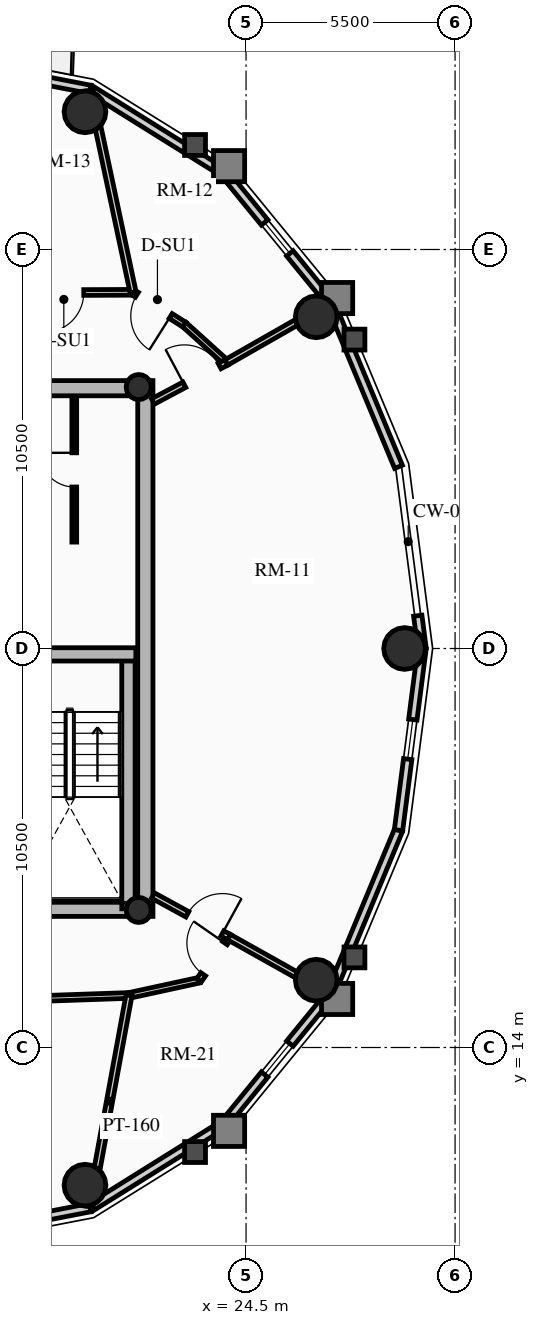
"""IFC4 building model, lengths in metres.
Left out: names, types, materials, properties, quantities, classifications, styles, units other than length and angle.
Written with IfcOpenShell. Run it as: python <this file> out.ifc"""

import sys

from ifc_helpers import new_model, si_unit, direction, frame, frame_2d, origin, origin_2d, place, context, subcontext, project, spatial, rectangle, circle, hollow_circle, extrude, source, transform, mapped, element, fill, save


model = new_model("IFC4")
c1 = context("Model", 3, precision=1e-05, world=origin(), true_north=direction((0.0, 1.0)))
c2 = subcontext(c1, "Body", "Model", "MODEL_VIEW")
j1 = project(units=[si_unit("LENGTHUNIT", "METRE"), si_unit("PLANEANGLEUNIT", "RADIAN")], contexts=[c1])
p1 = place(None, origin())
s1 = spatial("IfcSite", under=j1, at=p1, CompositionType="ELEMENT")
p2 = place(p1, origin())
s2 = spatial("IfcBuilding", under=s1, at=p2, CompositionType="ELEMENT")
p3 = place(p2, frame((0.0, 0.0, 208.3)))
s3 = spatial("IfcBuildingStorey", under=s2, at=p3, CompositionType="ELEMENT", Elevation=208.3)
p4 = place(p3, frame((21.85, 17.45, 0.0), z_axis=(0.0, 0.0, 1.0), x_axis=(0.0, 1.0, 0.0)))
e1 = element("IfcWall", 1, at=p4, inside=s3, PredefinedType="SHEAR", context=c2, shape_type="SweptSolid", body=[
    extrude(rectangle(XDim=14.1, YDim=0.4, at=frame_2d((7.05, 0.0))), origin(), (0.0, 0.0, 1.0), 2.91),
])
p5 = place(p3, frame((11.15, 17.65, 0.0), z_axis=(0.0, 0.0, 1.0), x_axis=(1.0, 0.0, 0.0)))
e2 = element("IfcWall", 2, at=p5, inside=s3, PredefinedType="SHEAR", context=c2, shape_type="SweptSolid", body=[
    extrude(rectangle(XDim=10.7, YDim=0.4, at=frame_2d((5.35, 0.0))), origin(), (0.0, 0.0, 1.0), 2.91),
])
m1 = source(origin(), c2, "Body", "SweptSolid", [
    extrude(rectangle(XDim=1.5, YDim=2.02, at=frame_2d((0.75, 1.01))), frame((0.0, 0.21, 0.0), z_axis=(0.0, -1.0, 0.0), x_axis=(1.0, 0.0, 0.0)), (0.0, 0.0, 1.0), 0.42),
])
p6 = place(p5, frame((5.45, 0.0, 0.0)))
e3 = element("IfcOpeningElement", 3, at=p6, cuts=e2, PredefinedType="OPENING", context=c2, shape_type="MappedRepresentation", body=[
    mapped(m1, transform((0.0, 0.0, 0.0), x_axis=(1.0, 0.0, 0.0), y_axis=(0.0, 1.0, 0.0), z_axis=(0.0, 0.0, 1.0), scale=1.0)),
])
p7 = place(p3, frame((11.15, 31.35, 0.0), z_axis=(0.0, 0.0, 1.0), x_axis=(1.0, 0.0, 0.0)))
e4 = element("IfcWall", 4, at=p7, inside=s3, PredefinedType="SHEAR", context=c2, shape_type="SweptSolid", body=[
    extrude(rectangle(XDim=10.7, YDim=0.4, at=frame_2d((5.35, 0.0))), origin(), (0.0, 0.0, 1.0), 2.91),
])
p8 = place(p7, frame((4.6, 0.0, 0.0)))
e5 = element("IfcOpeningElement", 5, at=p8, cuts=e4, PredefinedType="OPENING", context=c2, shape_type="MappedRepresentation", body=[
    mapped(m1, transform((0.0, 0.0, 0.0), x_axis=(1.0, 0.0, 0.0), y_axis=(0.0, 1.0, 0.0), z_axis=(0.0, 0.0, 1.0), scale=1.0)),
])
p9 = place(p3, frame((21.405, 17.65, 0.0), z_axis=(0.0, 0.0, 1.0), x_axis=(0.0, 1.0, 0.0)))
e6 = element("IfcWall", 6, at=p9, inside=s3, PredefinedType="SHEAR", context=c2, shape_type="SweptSolid", body=[
    extrude(rectangle(XDim=6.695, YDim=0.35, at=frame_2d((3.348, 0.0))), origin(), (0.0, 0.0, 1.0), 2.91),
])
p10 = place(p3, frame((18.315, 24.345, 0.0), z_axis=(0.0, 0.0, 1.0), x_axis=(1.0, 0.0, 0.0)))
e7 = element("IfcWall", 7, at=p10, inside=s3, PredefinedType="SHEAR", context=c2, shape_type="SweptSolid", body=[
    extrude(rectangle(XDim=3.285, YDim=0.35, at=frame_2d((1.643, 0.0))), origin(), (0.0, 0.0, 1.0), 2.91),
])
for number, where, z_axis, x_axis in (
    (8, (21.675, 17.62, 0.0), (0.0, 0.0, 1.0), (1.0, 0.0, 0.0)),
    (9, (21.675, 31.38, 0.0), (0.0, 0.0, 1.0), (1.0, 0.0, 0.0)),
):
    element("IfcColumn", number, at=place(p3, frame(where, z_axis=z_axis, x_axis=x_axis)), inside=s3, PredefinedType="COLUMN", context=c2, shape_type="SweptSolid", body=[
        extrude(hollow_circle(Radius=0.33, WallThickness=0.025, at=origin_2d()), origin(), (0.0, 0.0, 1.0), 2.91),
    ])
for number, where, z_axis, x_axis in (
    (10, (28.672, 24.5, 0.0), (0.0, 0.0, 1.0), (1.0, 0.0, 0.0)),
    (11, (26.347, 33.229, 0.0), (0.0, 0.0, 1.0), (1.0, 0.0, 0.0)),
    (12, (20.261, 38.623, 0.0), (0.0, 0.0, 1.0), (1.0, 0.0, 0.0)),
    (13, (20.261, 10.377, 0.0), (0.0, 0.0, 1.0), (1.0, 0.0, 0.0)),
    (14, (26.347, 15.771, 0.0), (0.0, 0.0, 1.0), (1.0, 0.0, 0.0)),
):
    element("IfcColumn", number, at=place(p3, frame(where, z_axis=z_axis, x_axis=x_axis)), inside=s3, PredefinedType="USERDEFINED", context=c2, shape_type="SweptSolid", body=[
        extrude(circle(Radius=0.55, at=origin_2d()), origin(), (0.0, 0.0, 1.0), 2.91),
    ])
p11 = place(p3, frame((29.018, 25.363, 0.0), z_axis=(0.0, 0.0, 1.0), x_axis=(0.128247365719, -0.991742211054, 0.0)))
e15 = element("IfcWall", 15, at=p11, inside=s3, PredefinedType="SOLIDWALL", context=c2, shape_type="SweptSolid", body=[
    extrude(rectangle(XDim=0.87, YDim=0.22, at=frame_2d((0.435, 0.0))), origin(), (0.0, 0.0, 1.0), 2.322),
])
p12 = place(p3, frame((26.718, 33.593, 0.0), z_axis=(0.0, 0.0, 1.0), x_axis=(0.384036305194, -0.923317993052, 0.0)))
e16 = element("IfcWall", 16, at=p12, inside=s3, PredefinedType="SOLIDWALL", context=c2, shape_type="SweptSolid", body=[
    extrude(rectangle(XDim=4.671, YDim=0.22, at=frame_2d((2.335, 0.0))), origin(), (0.0, 0.0, 1.0), 2.322),
])
p13 = place(p3, frame((23.924, 37.015, 0.0), z_axis=(0.0, 0.0, 1.0), x_axis=(0.632467166636, -0.774587169483, 0.0)))
e17 = element("IfcWall", 17, at=p13, inside=s3, PredefinedType="SOLIDWALL", context=c2, shape_type="SweptSolid", body=[
    extrude(rectangle(XDim=4.418, YDim=0.22, at=frame_2d((2.209, 0.0))), origin(), (0.0, 0.0, 1.0), 2.322),
])
m2 = source(origin(), c2, "Body", "SweptSolid", [
    extrude(rectangle(XDim=1.05, YDim=1.3, at=frame_2d((0.525, 0.65))), frame((0.0, 0.12, 0.0), z_axis=(0.0, -1.0, 0.0), x_axis=(1.0, 0.0, 0.0)), (0.0, 0.0, 1.0), 0.24),
])
p14 = place(p13, frame((1.684, 0.0, 0.65)))
e18 = element("IfcOpeningElement", 18, at=p14, cuts=e17, PredefinedType="OPENING", context=c2, shape_type="MappedRepresentation", body=[
    mapped(m2, transform((0.0, 0.0, 0.0), x_axis=(1.0, 0.0, 0.0), y_axis=(0.0, 1.0, 0.0), z_axis=(0.0, 0.0, 1.0), scale=1.0)),
])
p15 = place(p3, frame((20.403, 39.213, 0.0), z_axis=(0.0, 0.0, 1.0), x_axis=(0.848318713376, -0.529485939886, 0.0)))
e19 = element("IfcWall", 19, at=p15, inside=s3, PredefinedType="SOLIDWALL", context=c2, shape_type="SweptSolid", body=[
    extrude(rectangle(XDim=4.15, YDim=0.22, at=frame_2d((2.075, 0.0))), origin(), (0.0, 0.0, 1.0), 2.322),
])
p16 = place(p3, frame((16.5, 39.97, 0.0), z_axis=(0.0, 0.0, 1.0), x_axis=(0.981700307484, -0.190432419211, 0.0)))
e20 = element("IfcWall", 20, at=p16, inside=s3, PredefinedType="SOLIDWALL", context=c2, shape_type="SweptSolid", body=[
    extrude(rectangle(XDim=3.976, YDim=0.22, at=frame_2d((1.988, 0.0))), origin(), (0.0, 0.0, 1.0), 2.322),
])
m3 = source(origin(), c2, "Body", "SweptSolid", [
    extrude(rectangle(XDim=1.15, YDim=2.005, at=frame_2d((0.575, 1.002))), frame((0.0, 0.12, 0.0), z_axis=(0.0, -1.0, 0.0), x_axis=(1.0, 0.0, 0.0)), (0.0, 0.0, 1.0), 0.24),
])
p17 = place(p16, frame((1.413, 0.0, 0.0)))
e21 = element("IfcOpeningElement", 21, at=p17, cuts=e20, PredefinedType="OPENING", context=c2, shape_type="MappedRepresentation", body=[
    mapped(m3, transform((0.0, 0.0, 0.0), x_axis=(1.0, 0.0, 0.0), y_axis=(0.0, 1.0, 0.0), z_axis=(0.0, 0.0, 1.0), scale=1.0)),
])
p18 = place(p3, frame((20.403, 9.787, 0.0), z_axis=(0.0, 0.0, 1.0), x_axis=(-0.981700307484, -0.190432419211, 0.0)))
e22 = element("IfcWall", 22, at=p18, inside=s3, PredefinedType="SOLIDWALL", context=c2, shape_type="SweptSolid", body=[
    extrude(rectangle(XDim=3.976, YDim=0.22, at=frame_2d((1.988, 0.0))), origin(), (0.0, 0.0, 1.0), 2.322),
])
p19 = place(p18, frame((1.463, 0.0, 0.65)))
e23 = element("IfcOpeningElement", 23, at=p19, cuts=e22, PredefinedType="OPENING", context=c2, shape_type="MappedRepresentation", body=[
    mapped(m2, transform((0.0, 0.0, 0.0), x_axis=(1.0, 0.0, 0.0), y_axis=(0.0, 1.0, 0.0), z_axis=(0.0, 0.0, 1.0), scale=1.0)),
])
p20 = place(p3, frame((23.924, 11.985, 0.0), z_axis=(0.0, 0.0, 1.0), x_axis=(-0.848318713376, -0.529485939886, 0.0)))
e24 = element("IfcWall", 24, at=p20, inside=s3, PredefinedType="SOLIDWALL", context=c2, shape_type="SweptSolid", body=[
    extrude(rectangle(XDim=4.15, YDim=0.22, at=frame_2d((2.075, 0.0))), origin(), (0.0, 0.0, 1.0), 2.322),
])
p21 = place(p3, frame((26.718, 15.407, 0.0), z_axis=(0.0, 0.0, 1.0), x_axis=(-0.632467166636, -0.774587169483, 0.0)))
e25 = element("IfcWall", 25, at=p21, inside=s3, PredefinedType="SOLIDWALL", context=c2, shape_type="SweptSolid", body=[
    extrude(rectangle(XDim=4.418, YDim=0.22, at=frame_2d((2.209, 0.0))), origin(), (0.0, 0.0, 1.0), 2.322),
])
p22 = place(p21, frame((1.684, 0.0, 0.65)))
e26 = element("IfcOpeningElement", 26, at=p22, cuts=e25, PredefinedType="OPENING", context=c2, shape_type="MappedRepresentation", body=[
    mapped(m2, transform((0.0, 0.0, 0.0), x_axis=(1.0, 0.0, 0.0), y_axis=(0.0, 1.0, 0.0), z_axis=(0.0, 0.0, 1.0), scale=1.0)),
])
p23 = place(p3, frame((28.512, 19.719, 0.0), z_axis=(0.0, 0.0, 1.0), x_axis=(-0.384036305194, -0.923317993052, 0.0)))
e27 = element("IfcWall", 27, at=p23, inside=s3, PredefinedType="SOLIDWALL", context=c2, shape_type="SweptSolid", body=[
    extrude(rectangle(XDim=4.671, YDim=0.22, at=frame_2d((2.335, 0.0))), origin(), (0.0, 0.0, 1.0), 2.322),
])
p24 = place(p3, frame((29.13, 24.5, 0.0), z_axis=(0.0, 0.0, 1.0), x_axis=(-0.128241318541, -0.991742993027, 0.0)))
e28 = element("IfcWall", 28, at=p24, inside=s3, PredefinedType="SOLIDWALL", context=c2, shape_type="SweptSolid", body=[
    extrude(rectangle(XDim=4.82, YDim=0.22, at=frame_2d((2.41, 0.0))), origin(), (0.0, 0.0, 1.0), 2.322),
])
p25 = place(p24, frame((1.885, 0.0, 0.65)))
e29 = element("IfcOpeningElement", 29, at=p25, cuts=e28, PredefinedType="OPENING", context=c2, shape_type="MappedRepresentation", body=[
    mapped(m2, transform((0.0, 0.0, 0.0), x_axis=(1.0, 0.0, 0.0), y_axis=(0.0, 1.0, 0.0), z_axis=(0.0, 0.0, 1.0), scale=1.0)),
])
p26 = place(p3, frame((19.98, 27.3, 0.0), z_axis=(0.0, 0.0, 1.0), x_axis=(0.0, 1.0, 0.0)))
e30 = element("IfcWall", 30, at=p26, inside=s3, PredefinedType="PARTITIONING", context=c2, shape_type="SweptSolid", body=[
    extrude(rectangle(XDim=3.82, YDim=0.125, at=frame_2d((1.91, 0.0))), origin(), (0.0, 0.0, 1.0), 2.685),
])
m4 = source(origin(), c2, "Body", "SweptSolid", [
    extrude(rectangle(XDim=0.9, YDim=2.005, at=frame_2d((0.45, 1.002))), frame((0.0, 0.073, 0.0), z_axis=(0.0, -1.0, 0.0), x_axis=(1.0, 0.0, 0.0)), (0.0, 0.0, 1.0), 0.145),
])
p27 = place(p26, frame((1.45, 0.0, 0.0)))
e31 = element("IfcOpeningElement", 31, at=p27, cuts=e30, PredefinedType="OPENING", context=c2, shape_type="MappedRepresentation", body=[
    mapped(m4, transform((0.0, 0.0, 0.0), x_axis=(1.0, 0.0, 0.0), y_axis=(0.0, 1.0, 0.0), z_axis=(0.0, 0.0, 1.0), scale=1.0)),
])
p28 = place(p3, frame((23.98, 32.027, 0.0), z_axis=(0.0, 0.0, 1.0), x_axis=(-0.742353224332, 0.670008724065, 0.0)))
e32 = element("IfcWall", 32, at=p28, inside=s3, PredefinedType="PARTITIONING", context=c2, shape_type="SweptSolid", body=[
    extrude(rectangle(XDim=1.485, YDim=0.15, at=frame_2d((0.742, 0.0))), origin(), (0.0, 0.0, 1.0), 2.322),
])
p29 = place(p3, frame((22.877, 33.022, 0.0), z_axis=(0.0, 0.0, 1.0), x_axis=(-0.845895608855, 0.533348496689, 0.0)))
e33 = element("IfcWall", 33, at=p29, inside=s3, PredefinedType="PARTITIONING", context=c2, shape_type="SweptSolid", body=[
    extrude(rectangle(XDim=1.597, YDim=0.15, at=frame_2d((0.798, 0.0))), origin(), (0.0, 0.0, 1.0), 2.255),
])
m5 = source(origin(), c2, "Body", "SweptSolid", [
    extrude(rectangle(XDim=1.05, YDim=2.015, at=frame_2d((0.525, 1.007))), frame((0.0, 0.085, 0.0), z_axis=(0.0, -1.0, 0.0), x_axis=(1.0, 0.0, 0.0)), (0.0, 0.0, 1.0), 0.17),
])
p30 = place(p29, frame((0.427, 0.0, 0.0)))
e34 = element("IfcOpeningElement", 34, at=p30, cuts=e33, PredefinedType="OPENING", context=c2, shape_type="MappedRepresentation", body=[
    mapped(m5, transform((0.0, 0.0, 0.0), x_axis=(1.0, 0.0, 0.0), y_axis=(0.0, 1.0, 0.0), z_axis=(0.0, 0.0, 1.0), scale=1.0)),
])
p31 = place(p3, frame((21.527, 33.873, 0.0), z_axis=(0.0, 0.0, 1.0), x_axis=(-0.999991838845, -0.004040079574, 0.0)))
e35 = element("IfcWall", 35, at=p31, inside=s3, PredefinedType="PARTITIONING", context=c2, shape_type="SweptSolid", body=[
    extrude(rectangle(XDim=3.384, YDim=0.15, at=frame_2d((1.692, 0.0))), origin(), (0.0, 0.0, 1.0), 2.322),
])
p32 = place(p31, frame((1.298, 0.0, 0.0)))
e36 = element("IfcOpeningElement", 36, at=p32, cuts=e35, PredefinedType="OPENING", context=c2, shape_type="MappedRepresentation", body=[
    mapped(m5, transform((0.0, 0.0, 0.0), x_axis=(1.0, 0.0, 0.0), y_axis=(0.0, 1.0, 0.0), z_axis=(0.0, 0.0, 1.0), scale=1.0)),
])
p33 = place(p3, frame((14.781, 15.141, 0.0), z_axis=(0.0, 0.0, 1.0), x_axis=(0.999407918707, 0.034406569513, 0.0)))
e37 = element("IfcWall", 37, at=p33, inside=s3, PredefinedType="PARTITIONING", context=c2, shape_type="SweptSolid", body=[
    extrude(rectangle(XDim=6.642, YDim=0.15, at=frame_2d((3.321, 0.0))), origin(), (0.0, 0.0, 1.0), 2.255),
])
p34 = place(p33, frame((2.796, 0.0, 0.0)))
e38 = element("IfcOpeningElement", 38, at=p34, cuts=e37, PredefinedType="OPENING", context=c2, shape_type="MappedRepresentation", body=[
    mapped(m5, transform((0.0, 0.0, 0.0), x_axis=(1.0, 0.0, 0.0), y_axis=(0.0, 1.0, 0.0), z_axis=(0.0, 0.0, 1.0), scale=1.0)),
])
p35 = place(p3, frame((21.419, 15.369, 0.0), z_axis=(0.0, 0.0, 1.0), x_axis=(0.977192701953, 0.212354475464, 0.0)))
e39 = element("IfcWall", 39, at=p35, inside=s3, PredefinedType="PARTITIONING", context=c2, shape_type="SweptSolid", body=[
    extrude(rectangle(XDim=1.888, YDim=0.15, at=frame_2d((0.944, 0.0))), origin(), (0.0, 0.0, 1.0), 2.255),
])
p36 = place(p3, frame((23.263, 15.77, 0.0), z_axis=(0.0, 0.0, 1.0), x_axis=(0.570743456919, 0.821128434768, 0.0)))
e40 = element("IfcWall", 40, at=p36, inside=s3, PredefinedType="PARTITIONING", context=c2, shape_type="SweptSolid", body=[
    extrude(rectangle(XDim=1.382, YDim=0.15, at=frame_2d((0.691, 0.0))), origin(), (0.0, 0.0, 1.0), 2.322),
])
m6 = source(origin(), c2, "Body", "SweptSolid", [
    extrude(rectangle(XDim=1.0, YDim=2.015, at=frame_2d((0.5, 1.007))), frame((0.0, 0.085, 0.0), z_axis=(0.0, -1.0, 0.0), x_axis=(1.0, 0.0, 0.0)), (0.0, 0.0, 1.0), 0.17),
])
p37 = place(p36, frame((0.191, 0.0, 0.0)))
e41 = element("IfcOpeningElement", 41, at=p37, cuts=e40, PredefinedType="OPENING", context=c2, shape_type="MappedRepresentation", body=[
    mapped(m6, transform((0.0, 0.0, 0.0), x_axis=(1.0, 0.0, 0.0), y_axis=(0.0, 1.0, 0.0), z_axis=(0.0, 0.0, 1.0), scale=1.0)),
])
p38 = place(p3, frame((23.98, 32.027, 0.0), z_axis=(0.0, 0.0, 1.0), x_axis=(0.868372526378, 0.495912447345, 0.0)))
e42 = element("IfcWall", 42, at=p38, inside=s3, PredefinedType="PARTITIONING", context=c2, shape_type="SweptSolid", body=[
    extrude(rectangle(XDim=3.135, YDim=0.16, at=frame_2d((1.567, 0.0))), origin(), (0.0, 0.0, 1.0), 2.322),
])
p39 = place(p3, frame((21.527, 33.873, 0.0), z_axis=(0.0, 0.0, 1.0), x_axis=(-0.207772326864, 0.97817721308, 0.0)))
e43 = element("IfcWall", 43, at=p39, inside=s3, PredefinedType="PARTITIONING", context=c2, shape_type="SweptSolid", body=[
    extrude(rectangle(XDim=5.439, YDim=0.16, at=frame_2d((2.72, 0.0))), origin(), (0.0, 0.0, 1.0), 2.322),
])
p40 = place(p3, frame((21.419, 15.369, 0.0), z_axis=(0.0, 0.0, 1.0), x_axis=(-0.180685606423, -0.98354090491, 0.0)))
e44 = element("IfcWall", 44, at=p40, inside=s3, PredefinedType="PARTITIONING", context=c2, shape_type="SweptSolid", body=[
    extrude(rectangle(XDim=5.656, YDim=0.16, at=frame_2d((2.828, 0.0))), origin(), (0.0, 0.0, 1.0), 2.322),
])
p41 = place(p3, frame((24.052, 16.905, 0.0), z_axis=(0.0, 0.0, 1.0), x_axis=(0.872220814965, -0.489112308106, 0.0)))
e45 = element("IfcWall", 45, at=p41, inside=s3, PredefinedType="PARTITIONING", context=c2, shape_type="SweptSolid", body=[
    extrude(rectangle(XDim=3.038, YDim=0.16, at=frame_2d((1.519, 0.0))), origin(), (0.0, 0.0, 1.0), 2.322),
])
p42 = place(p3, frame((22.05, 31.0, 0.0), z_axis=(0.0, 0.0, 1.0), x_axis=(0.882791584709, 0.469764853908, 0.0)))
e46 = element("IfcWall", 46, at=p42, inside=s3, PredefinedType="PARTITIONING", context=c2, shape_type="SweptSolid", body=[
    extrude(rectangle(XDim=2.186, YDim=0.16, at=frame_2d((1.093, 0.0))), origin(), (0.0, 0.0, 1.0), 2.255),
])
m7 = source(origin(), c2, "Body", "SweptSolid", [
    extrude(rectangle(XDim=1.05, YDim=2.015, at=frame_2d((0.525, 1.007))), frame((0.0, 0.09, 0.0), z_axis=(0.0, -1.0, 0.0), x_axis=(1.0, 0.0, 0.0)), (0.0, 0.0, 1.0), 0.18),
])
p43 = place(p42, frame((0.936, 0.0, 0.0)))
e47 = element("IfcOpeningElement", 47, at=p43, cuts=e46, PredefinedType="OPENING", context=c2, shape_type="MappedRepresentation", body=[
    mapped(m7, transform((0.0, 0.0, 0.0), x_axis=(1.0, 0.0, 0.0), y_axis=(0.0, 1.0, 0.0), z_axis=(0.0, 0.0, 1.0), scale=1.0)),
])
p44 = place(p3, frame((22.05, 18.0, 0.0), z_axis=(0.0, 0.0, 1.0), x_axis=(0.877252891813, -0.480028503118, 0.0)))
e48 = element("IfcWall", 48, at=p44, inside=s3, PredefinedType="PARTITIONING", context=c2, shape_type="SweptSolid", body=[
    extrude(rectangle(XDim=2.282, YDim=0.16, at=frame_2d((1.141, 0.0))), origin(), (0.0, 0.0, 1.0), 2.255),
])
p45 = place(p44, frame((1.032, 0.0, 0.0)))
e49 = element("IfcOpeningElement", 49, at=p45, cuts=e48, PredefinedType="OPENING", context=c2, shape_type="MappedRepresentation", body=[
    mapped(m7, transform((0.0, 0.0, 0.0), x_axis=(1.0, 0.0, 0.0), y_axis=(0.0, 1.0, 0.0), z_axis=(0.0, 0.0, 1.0), scale=1.0)),
])
m8 = source(origin(), c2, "Body", "SweptSolid", [
    extrude(rectangle(XDim=1.05, YDim=1.3, at=frame_2d((0.525, 0.65))), frame((0.0, 0.03, 0.0), z_axis=(0.0, -1.0, 0.0), x_axis=(1.0, 0.0, 0.0)), (0.0, 0.0, 1.0), 0.06),
])
p46 = place(p14, origin())
e50 = element("IfcWindow", 50, at=p46, inside=s3, PartitioningType="SINGLE_PANEL", PredefinedType="WINDOW", context=c2, shape_type="MappedRepresentation", body=[
    mapped(m8, transform((0.0, 0.0, 0.0), x_axis=(1.0, 0.0, 0.0), y_axis=(0.0, 1.0, 0.0), z_axis=(0.0, 0.0, 1.0), scale=1.0)),
])
fill(e18, e50)
p47 = place(p22, origin())
e51 = element("IfcWindow", 51, at=p47, inside=s3, PartitioningType="SINGLE_PANEL", PredefinedType="WINDOW", context=c2, shape_type="MappedRepresentation", body=[
    mapped(m8, transform((0.0, 0.0, 0.0), x_axis=(1.0, 0.0, 0.0), y_axis=(0.0, 1.0, 0.0), z_axis=(0.0, 0.0, 1.0), scale=1.0)),
])
fill(e26, e51)
p48 = place(p25, origin())
e52 = element("IfcWindow", 52, at=p48, inside=s3, PartitioningType="SINGLE_PANEL", PredefinedType="WINDOW", context=c2, shape_type="MappedRepresentation", body=[
    mapped(m8, transform((0.0, 0.0, 0.0), x_axis=(1.0, 0.0, 0.0), y_axis=(0.0, 1.0, 0.0), z_axis=(0.0, 0.0, 1.0), scale=1.0)),
])
fill(e29, e52)
m9 = source(origin(), c2, "Body", "SweptSolid", [
    extrude(rectangle(XDim=0.9, YDim=2.005, at=frame_2d((0.45, 1.002))), frame((0.0, 0.025, 0.0), z_axis=(0.0, -1.0, 0.0), x_axis=(1.0, 0.0, 0.0)), (0.0, 0.0, 1.0), 0.05),
])
p49 = place(p27, origin())
e53 = element("IfcDoor", 53, at=p49, inside=s3, OperationType="SINGLE_SWING_RIGHT", PredefinedType="DOOR", context=c2, shape_type="MappedRepresentation", body=[
    mapped(m9, transform((0.0, 0.0, 0.0), x_axis=(1.0, 0.0, 0.0), y_axis=(0.0, 1.0, 0.0), z_axis=(0.0, 0.0, 1.0), scale=1.0)),
])
fill(e31, e53)
m10 = source(origin(), c2, "Body", "SweptSolid", [
    extrude(rectangle(XDim=1.05, YDim=2.015, at=frame_2d((0.525, 1.007))), frame((0.0, 0.025, 0.0), z_axis=(0.0, -1.0, 0.0), x_axis=(1.0, 0.0, 0.0)), (0.0, 0.0, 1.0), 0.05),
])
p50 = place(p43, origin())
e54 = element("IfcDoor", 54, at=p50, inside=s3, OperationType="SINGLE_SWING_LEFT", PredefinedType="DOOR", context=c2, shape_type="MappedRepresentation", body=[
    mapped(m10, transform((0.0, 0.0, 0.0), x_axis=(1.0, 0.0, 0.0), y_axis=(0.0, 1.0, 0.0), z_axis=(0.0, 0.0, 1.0), scale=1.0)),
])
fill(e47, e54)
p51 = place(p45, origin())
e55 = element("IfcDoor", 55, at=p51, inside=s3, OperationType="SINGLE_SWING_RIGHT", PredefinedType="DOOR", context=c2, shape_type="MappedRepresentation", body=[
    mapped(m10, transform((0.0, 0.0, 0.0), x_axis=(1.0, 0.0, 0.0), y_axis=(0.0, 1.0, 0.0), z_axis=(0.0, 0.0, 1.0), scale=1.0)),
])
fill(e49, e55)
p52 = place(p30, origin())
e56 = element("IfcDoor", 56, at=p52, inside=s3, OperationType="SINGLE_SWING_LEFT", PredefinedType="DOOR", context=c2, shape_type="MappedRepresentation", body=[
    mapped(m10, transform((0.0, 0.0, 0.0), x_axis=(1.0, 0.0, 0.0), y_axis=(0.0, 1.0, 0.0), z_axis=(0.0, 0.0, 1.0), scale=1.0)),
])
fill(e34, e56)
p53 = place(p32, origin())
e57 = element("IfcDoor", 57, at=p53, inside=s3, OperationType="SINGLE_SWING_RIGHT", PredefinedType="DOOR", context=c2, shape_type="MappedRepresentation", body=[
    mapped(m10, transform((0.0, 0.0, 0.0), x_axis=(1.0, 0.0, 0.0), y_axis=(0.0, 1.0, 0.0), z_axis=(0.0, 0.0, 1.0), scale=1.0)),
])
fill(e36, e57)
m11 = source(origin(), c2, "Body", "SweptSolid", [
    extrude(rectangle(XDim=1.0, YDim=2.015, at=frame_2d((0.5, 1.007))), frame((0.0, 0.025, 0.0), z_axis=(0.0, -1.0, 0.0), x_axis=(1.0, 0.0, 0.0)), (0.0, 0.0, 1.0), 0.05),
])
p54 = place(p37, origin())
e58 = element("IfcDoor", 58, at=p54, inside=s3, OperationType="SINGLE_SWING_RIGHT", PredefinedType="DOOR", context=c2, shape_type="MappedRepresentation", body=[
    mapped(m11, transform((0.0, 0.0, 0.0), x_axis=(1.0, 0.0, 0.0), y_axis=(0.0, 1.0, 0.0), z_axis=(0.0, 0.0, 1.0), scale=1.0)),
])
fill(e41, e58)
save(model, sys.argv[1])
